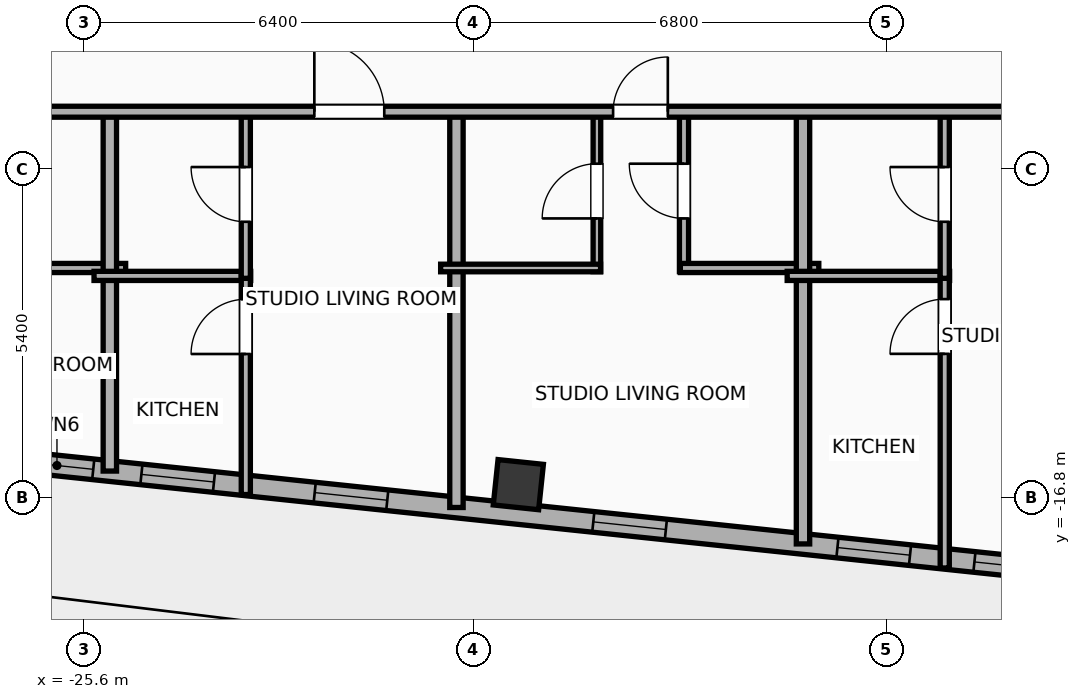
"""IFC4 building model, lengths in metres.
Left out: names, types, materials, properties, quantities, classifications, styles, units other than length and angle.
Written with IfcOpenShell. Run it as: python <this file> out.ifc"""

import sys

from ifc_helpers import new_model, si_unit, direction, frame, frame_2d, origin, origin_2d, place, context, subcontext, project, spatial, rectangle, hollow_rectangle, extrude, element, fill, save


model = new_model("IFC4")
c1 = context("Model", 3, precision=1e-05, world=origin(), true_north=direction((0.0, 1.0)))
c2 = subcontext(c1, "Body", "Model", "MODEL_VIEW")
j1 = project(units=[si_unit("LENGTHUNIT", "METRE"), si_unit("PLANEANGLEUNIT", "RADIAN")], contexts=[c1])
p1 = place(None, origin())
s1 = spatial("IfcSite", under=j1, at=p1, CompositionType="ELEMENT")
p2 = place(p1, origin())
s2 = spatial("IfcBuilding", under=s1, at=p2, CompositionType="ELEMENT")
p3 = place(p2, frame((0.0, 0.0, 291.2)))
s3 = spatial("IfcBuildingStorey", under=s2, at=p3, CompositionType="ELEMENT", Elevation=291.2)
p4 = place(p3, frame((-18.46, -16.583, 0.0), z_axis=(0.0, 0.0, 1.0), x_axis=(0.994521895368, -0.104528463268, 0.0)))
e1 = element("IfcColumn", 1, at=p4, inside=s3, PredefinedType="COLUMN", context=c2, shape_type="SweptSolid", body=[
    extrude(hollow_rectangle(XDim=0.75, YDim=0.75, WallThickness=0.025, at=origin_2d()), origin(), (0.0, 0.0, 1.0), 3.9),
])
p5 = place(p3, frame((18.708, -20.972, 0.0), z_axis=(0.0, 0.0, 1.0), x_axis=(-0.994521888554, 0.104528528102, 0.0)))
e2 = element("IfcWall", 2, at=p5, inside=s3, PredefinedType="ELEMENTEDWALL", context=c2, shape_type="SweptSolid", body=[
    extrude(rectangle(XDim=46.766, YDim=0.34, at=frame_2d((23.383, 0.0))), origin(), (0.0, 0.0, 1.0), 3.635),
])
p6 = place(p5, frame((23.733, 0.0, 0.65)))
e3 = element("IfcOpeningElement", 3, at=p6, cuts=e2, PredefinedType="OPENING", context=c2, shape_type="SweptSolid", body=[
    extrude(rectangle(XDim=2.6, YDim=2.45, at=frame_2d((1.3, 1.225))), frame((0.0, 0.18, 0.0), z_axis=(0.0, -1.0, 0.0), x_axis=(1.0, 0.0, 0.0)), (0.0, 0.0, 1.0), 0.36),
])
p7 = place(p5, frame((44.402, 0.0, 0.75)))
e4 = element("IfcOpeningElement", 4, at=p7, cuts=e2, PredefinedType="OPENING", context=c2, shape_type="SweptSolid", body=[
    extrude(rectangle(XDim=1.2, YDim=2.05, at=frame_2d((0.6, 1.025))), frame((0.0, 0.18, 0.0), z_axis=(0.0, -1.0, 0.0), x_axis=(1.0, 0.0, 0.0)), (0.0, 0.0, 1.0), 0.36),
])
p8 = place(p5, frame((39.54, 0.0, 0.75)))
e5 = element("IfcOpeningElement", 5, at=p8, cuts=e2, PredefinedType="OPENING", context=c2, shape_type="SweptSolid", body=[
    extrude(rectangle(XDim=1.2, YDim=2.05, at=frame_2d((0.6, 1.025))), frame((0.0, 0.18, 0.0), z_axis=(0.0, -1.0, 0.0), x_axis=(1.0, 0.0, 0.0)), (0.0, 0.0, 1.0), 0.36),
])
p9 = place(p5, frame((42.406, 0.0, 0.75)))
e6 = element("IfcOpeningElement", 6, at=p9, cuts=e2, PredefinedType="OPENING", context=c2, shape_type="SweptSolid", body=[
    extrude(rectangle(XDim=1.2, YDim=2.05, at=frame_2d((0.6, 1.025))), frame((0.0, 0.18, 0.0), z_axis=(0.0, -1.0, 0.0), x_axis=(1.0, 0.0, 0.0)), (0.0, 0.0, 1.0), 0.36),
])
p10 = place(p5, frame((34.933, 0.0, 0.75)))
e7 = element("IfcOpeningElement", 7, at=p10, cuts=e2, PredefinedType="OPENING", context=c2, shape_type="SweptSolid", body=[
    extrude(rectangle(XDim=1.2, YDim=2.05, at=frame_2d((0.6, 1.025))), frame((0.0, 0.18, 0.0), z_axis=(0.0, -1.0, 0.0), x_axis=(1.0, 0.0, 0.0)), (0.0, 0.0, 1.0), 0.36),
])
p11 = place(p5, frame((28.631, 0.0, 0.75)))
e8 = element("IfcOpeningElement", 8, at=p11, cuts=e2, PredefinedType="OPENING", context=c2, shape_type="SweptSolid", body=[
    extrude(rectangle(XDim=1.2, YDim=2.05, at=frame_2d((0.6, 1.025))), frame((0.0, 0.18, 0.0), z_axis=(0.0, -1.0, 0.0), x_axis=(1.0, 0.0, 0.0)), (0.0, 0.0, 1.0), 0.36),
])
p12 = place(p5, frame((30.896, 0.0, 0.75)))
e9 = element("IfcOpeningElement", 9, at=p12, cuts=e2, PredefinedType="OPENING", context=c2, shape_type="SweptSolid", body=[
    extrude(rectangle(XDim=1.2, YDim=2.05, at=frame_2d((0.6, 1.025))), frame((0.0, 0.18, 0.0), z_axis=(0.0, -1.0, 0.0), x_axis=(1.0, 0.0, 0.0)), (0.0, 0.0, 1.0), 0.36),
])
p13 = place(p5, frame((7.501, 0.0, 0.75)))
e10 = element("IfcOpeningElement", 10, at=p13, cuts=e2, PredefinedType="OPENING", context=c2, shape_type="SweptSolid", body=[
    extrude(rectangle(XDim=1.2, YDim=2.05, at=frame_2d((0.6, 1.025))), frame((0.0, 0.18, 0.0), z_axis=(0.0, -1.0, 0.0), x_axis=(1.0, 0.0, 0.0)), (0.0, 0.0, 1.0), 0.36),
])
p14 = place(p5, frame((4.159, 0.0, 0.75)))
e11 = element("IfcOpeningElement", 11, at=p14, cuts=e2, PredefinedType="OPENING", context=c2, shape_type="SweptSolid", body=[
    extrude(rectangle(XDim=1.2, YDim=2.05, at=frame_2d((0.6, 1.025))), frame((0.0, 0.18, 0.0), z_axis=(0.0, -1.0, 0.0), x_axis=(1.0, 0.0, 0.0)), (0.0, 0.0, 1.0), 0.36),
])
p15 = place(p5, frame((1.369, 0.0, 0.75)))
e12 = element("IfcOpeningElement", 12, at=p15, cuts=e2, PredefinedType="OPENING", context=c2, shape_type="SweptSolid", body=[
    extrude(rectangle(XDim=1.2, YDim=2.05, at=frame_2d((0.6, 1.025))), frame((0.0, 0.18, 0.0), z_axis=(0.0, -1.0, 0.0), x_axis=(1.0, 0.0, 0.0)), (0.0, 0.0, 1.0), 0.36),
])
p16 = place(p5, frame((20.254, 0.0, 0.75)))
e13 = element("IfcOpeningElement", 13, at=p16, cuts=e2, PredefinedType="OPENING", context=c2, shape_type="SweptSolid", body=[
    extrude(rectangle(XDim=1.2, YDim=2.05, at=frame_2d((0.6, 1.025))), frame((0.0, 0.18, 0.0), z_axis=(0.0, -1.0, 0.0), x_axis=(1.0, 0.0, 0.0)), (0.0, 0.0, 1.0), 0.36),
])
p17 = place(p5, frame((16.172, 0.0, 0.75)))
e14 = element("IfcOpeningElement", 14, at=p17, cuts=e2, PredefinedType="OPENING", context=c2, shape_type="SweptSolid", body=[
    extrude(rectangle(XDim=1.2, YDim=2.05, at=frame_2d((0.6, 1.025))), frame((0.0, 0.18, 0.0), z_axis=(0.0, -1.0, 0.0), x_axis=(1.0, 0.0, 0.0)), (0.0, 0.0, 1.0), 0.36),
])
p18 = place(p5, frame((12.11, 0.0, 0.75)))
e15 = element("IfcOpeningElement", 15, at=p18, cuts=e2, PredefinedType="OPENING", context=c2, shape_type="SweptSolid", body=[
    extrude(rectangle(XDim=1.2, YDim=2.05, at=frame_2d((0.6, 1.025))), frame((0.0, 0.18, 0.0), z_axis=(0.0, -1.0, 0.0), x_axis=(1.0, 0.0, 0.0)), (0.0, 0.0, 1.0), 0.36),
])
p19 = place(p3, frame((-27.215, -13.02, 0.0), z_axis=(0.0, 0.0, 1.0), x_axis=(1.0, 0.0, 0.0)))
e16 = element("IfcWall", 16, at=p19, inside=s3, PredefinedType="PLUMBINGWALL", context=c2, shape_type="SweptSolid", body=[
    extrude(rectangle(XDim=2.297, YDim=0.15, at=frame_2d((1.148, 0.0))), origin(), (0.0, 0.0, 1.0), 3.635),
])
p20 = place(p3, frame((-25.178, -16.36, 0.0), z_axis=(0.0, 0.0, 1.0), x_axis=(0.0, 1.0, 0.0)))
e17 = element("IfcWall", 17, at=p20, inside=s3, PredefinedType="PARTITIONING", context=c2, shape_type="SweptSolid", body=[
    extrude(rectangle(XDim=5.99, YDim=0.22, at=frame_2d((2.995, 0.0))), origin(), (0.0, 0.0, 1.0), 3.635),
])
p21 = place(p3, frame((-25.438, -13.15, 0.0), z_axis=(0.0, 0.0, 1.0), x_axis=(1.0, 0.0, 0.0)))
e18 = element("IfcWall", 18, at=p21, inside=s3, PredefinedType="PLUMBINGWALL", context=c2, shape_type="SweptSolid", body=[
    extrude(rectangle(XDim=2.576, YDim=0.15, at=frame_2d((1.288, 0.0))), origin(), (0.0, 0.0, 1.0), 3.635),
])
p22 = place(p3, frame((-22.942, -16.745, 0.0), z_axis=(0.0, 0.0, 1.0), x_axis=(0.0, 1.0, 0.0)))
e19 = element("IfcWall", 19, at=p22, inside=s3, PredefinedType="PLUMBINGWALL", context=c2, shape_type="SweptSolid", body=[
    extrude(rectangle(XDim=3.635, YDim=0.15, at=frame_2d((1.818, 0.0))), origin(), (0.0, 0.0, 1.0), 3.635),
])
p23 = place(p22, frame((2.311, 0.0, 0.0)))
e20 = element("IfcOpeningElement", 20, at=p23, cuts=e19, PredefinedType="OPENING", context=c2, shape_type="SweptSolid", body=[
    extrude(rectangle(XDim=0.9, YDim=2.05, at=frame_2d((0.45, 1.025))), frame((0.0, 0.085, 0.0), z_axis=(0.0, -1.0, 0.0), x_axis=(1.0, 0.0, 0.0)), (0.0, 0.0, 1.0), 0.17),
])
p24 = place(p3, frame((-22.942, -13.19, 0.0), z_axis=(0.0, 0.0, 1.0), x_axis=(0.0, 1.0, 0.0)))
e21 = element("IfcWall", 21, at=p24, inside=s3, PredefinedType="PLUMBINGWALL", context=c2, shape_type="SweptSolid", body=[
    extrude(rectangle(XDim=2.76, YDim=0.15, at=frame_2d((1.38, 0.0))), origin(), (0.0, 0.0, 1.0), 3.635),
])
p25 = place(p24, frame((0.93, 0.0, 0.0)))
e22 = element("IfcOpeningElement", 22, at=p25, cuts=e21, PredefinedType="OPENING", context=c2, shape_type="SweptSolid", body=[
    extrude(rectangle(XDim=0.9, YDim=2.05, at=frame_2d((0.45, 1.025))), frame((0.0, 0.085, 0.0), z_axis=(0.0, -1.0, 0.0), x_axis=(1.0, 0.0, 0.0)), (0.0, 0.0, 1.0), 0.17),
])
p26 = place(p3, frame((-19.478, -16.959, 0.0), z_axis=(0.0, 0.0, 1.0), x_axis=(0.0, 1.0, 0.0)))
e23 = element("IfcWall", 23, at=p26, inside=s3, PredefinedType="PARTITIONING", context=c2, shape_type="SweptSolid", body=[
    extrude(rectangle(XDim=6.589, YDim=0.22, at=frame_2d((3.294, 0.0))), origin(), (0.0, 0.0, 1.0), 3.635),
])
p27 = place(p3, frame((-17.168, -13.08, 0.0), z_axis=(0.0, 0.0, 1.0), x_axis=(0.0, 1.0, 0.0)))
e24 = element("IfcWall", 24, at=p27, inside=s3, PredefinedType="PARTITIONING", context=c2, shape_type="SweptSolid", body=[
    extrude(rectangle(XDim=2.65, YDim=0.125, at=frame_2d((1.325, 0.0))), origin(), (0.0, 0.0, 1.0), 3.635),
])
p28 = place(p27, frame((0.875, 0.0, 0.0)))
e25 = element("IfcOpeningElement", 25, at=p28, cuts=e24, PredefinedType="OPENING", context=c2, shape_type="SweptSolid", body=[
    extrude(rectangle(XDim=0.9, YDim=2.05, at=frame_2d((0.45, 1.025))), frame((0.0, 0.073, 0.0), z_axis=(0.0, -1.0, 0.0), x_axis=(1.0, 0.0, 0.0)), (0.0, 0.0, 1.0), 0.145),
])
p29 = place(p3, frame((-15.736, -13.08, 0.0), z_axis=(0.0, 0.0, 1.0), x_axis=(0.0, 1.0, 0.0)))
e26 = element("IfcWall", 26, at=p29, inside=s3, PredefinedType="PLUMBINGWALL", context=c2, shape_type="SweptSolid", body=[
    extrude(rectangle(XDim=2.65, YDim=0.15, at=frame_2d((1.325, 0.0))), origin(), (0.0, 0.0, 1.0), 3.635),
])
p30 = place(p29, frame((0.875, 0.0, 0.0)))
e27 = element("IfcOpeningElement", 27, at=p30, cuts=e26, PredefinedType="OPENING", context=c2, shape_type="SweptSolid", body=[
    extrude(rectangle(XDim=0.9, YDim=2.05, at=frame_2d((0.45, 1.025))), frame((0.0, 0.085, 0.0), z_axis=(0.0, -1.0, 0.0), x_axis=(1.0, 0.0, 0.0)), (0.0, 0.0, 1.0), 0.17),
])
p31 = place(p3, frame((-19.738, -13.02, 0.0), z_axis=(0.0, 0.0, 1.0), x_axis=(1.0, 0.0, 0.0)))
e28 = element("IfcWall", 28, at=p31, inside=s3, PredefinedType="PARTITIONING", context=c2, shape_type="SweptSolid", body=[
    extrude(rectangle(XDim=2.63, YDim=0.125, at=frame_2d((1.315, 0.0))), origin(), (0.0, 0.0, 1.0), 3.635),
])
p32 = place(p3, frame((-15.796, -13.02, 0.0), z_axis=(0.0, 0.0, 1.0), x_axis=(1.0, 0.0, 0.0)))
e29 = element("IfcWall", 29, at=p32, inside=s3, PredefinedType="PLUMBINGWALL", context=c2, shape_type="SweptSolid", body=[
    extrude(rectangle(XDim=2.277, YDim=0.15, at=frame_2d((1.138, 0.0))), origin(), (0.0, 0.0, 1.0), 3.635),
])
p33 = place(p3, frame((-13.779, -17.558, 0.0), z_axis=(0.0, 0.0, 1.0), x_axis=(0.0, 1.0, 0.0)))
e30 = element("IfcWall", 30, at=p33, inside=s3, PredefinedType="PARTITIONING", context=c2, shape_type="SweptSolid", body=[
    extrude(rectangle(XDim=7.188, YDim=0.22, at=frame_2d((3.594, 0.0))), origin(), (0.0, 0.0, 1.0), 3.635),
])
p34 = place(p3, frame((-14.039, -13.15, 0.0), z_axis=(0.0, 0.0, 1.0), x_axis=(1.0, 0.0, 0.0)))
e31 = element("IfcWall", 31, at=p34, inside=s3, PredefinedType="PLUMBINGWALL", context=c2, shape_type="SweptSolid", body=[
    extrude(rectangle(XDim=2.671, YDim=0.15, at=frame_2d((1.335, 0.0))), origin(), (0.0, 0.0, 1.0), 3.635),
])
p35 = place(p3, frame((-11.448, -17.954, 0.0), z_axis=(0.0, 0.0, 1.0), x_axis=(0.0, 1.0, 0.0)))
e32 = element("IfcWall", 32, at=p35, inside=s3, PredefinedType="PLUMBINGWALL", context=c2, shape_type="SweptSolid", body=[
    extrude(rectangle(XDim=4.844, YDim=0.15, at=frame_2d((2.422, 0.0))), origin(), (0.0, 0.0, 1.0), 3.635),
])
p36 = place(p35, frame((3.522, 0.0, 0.0)))
e33 = element("IfcOpeningElement", 33, at=p36, cuts=e32, PredefinedType="OPENING", context=c2, shape_type="SweptSolid", body=[
    extrude(rectangle(XDim=0.9, YDim=2.05, at=frame_2d((0.45, 1.025))), frame((0.0, 0.085, 0.0), z_axis=(0.0, -1.0, 0.0), x_axis=(1.0, 0.0, 0.0)), (0.0, 0.0, 1.0), 0.17),
])
p37 = place(p3, frame((-11.448, -13.19, 0.0), z_axis=(0.0, 0.0, 1.0), x_axis=(0.0, 1.0, 0.0)))
e34 = element("IfcWall", 34, at=p37, inside=s3, PredefinedType="PLUMBINGWALL", context=c2, shape_type="SweptSolid", body=[
    extrude(rectangle(XDim=2.76, YDim=0.15, at=frame_2d((1.38, 0.0))), origin(), (0.0, 0.0, 1.0), 3.075),
])
p38 = place(p37, frame((0.93, 0.0, 0.0)))
e35 = element("IfcOpeningElement", 35, at=p38, cuts=e34, PredefinedType="OPENING", context=c2, shape_type="SweptSolid", body=[
    extrude(rectangle(XDim=0.9, YDim=2.05, at=frame_2d((0.45, 1.025))), frame((0.0, 0.085, 0.0), z_axis=(0.0, -1.0, 0.0), x_axis=(1.0, 0.0, 0.0)), (0.0, 0.0, 1.0), 0.17),
])
p39 = place(p3, frame((-30.676, -10.45, 0.0), z_axis=(0.0, 0.0, 1.0), x_axis=(1.0, 0.0, 0.0)))
e36 = element("IfcWall", 36, at=p39, inside=s3, PredefinedType="PARTITIONING", context=c2, shape_type="SweptSolid", body=[
    extrude(rectangle(XDim=22.596, YDim=0.18, at=frame_2d((11.298, 0.0))), origin(), (0.0, 0.0, 1.0), 3.635),
])
p40 = place(p39, frame((2.336, 0.0, 0.0)))
e37 = element("IfcOpeningElement", 37, at=p40, cuts=e36, PredefinedType="OPENING", context=c2, shape_type="SweptSolid", body=[
    extrude(rectangle(XDim=0.9, YDim=2.05, at=frame_2d((0.45, 1.025))), frame((0.0, 0.1, 0.0), z_axis=(0.0, -1.0, 0.0), x_axis=(1.0, 0.0, 0.0)), (0.0, 0.0, 1.0), 0.2),
])
p41 = place(p39, frame((8.861, 0.0, 0.0)))
e38 = element("IfcOpeningElement", 38, at=p41, cuts=e36, PredefinedType="OPENING", context=c2, shape_type="SweptSolid", body=[
    extrude(rectangle(XDim=1.15, YDim=2.05, at=frame_2d((0.575, 1.025))), frame((0.0, 0.1, 0.0), z_axis=(0.0, -1.0, 0.0), x_axis=(1.0, 0.0, 0.0)), (0.0, 0.0, 1.0), 0.2),
])
p42 = place(p39, frame((13.774, 0.0, 0.0)))
e39 = element("IfcOpeningElement", 39, at=p42, cuts=e36, PredefinedType="OPENING", context=c2, shape_type="SweptSolid", body=[
    extrude(rectangle(XDim=0.9, YDim=2.05, at=frame_2d((0.45, 1.025))), frame((0.0, 0.1, 0.0), z_axis=(0.0, -1.0, 0.0), x_axis=(1.0, 0.0, 0.0)), (0.0, 0.0, 1.0), 0.2),
])
p43 = place(p39, frame((20.306, 0.0, 0.0)))
e40 = element("IfcOpeningElement", 40, at=p43, cuts=e36, PredefinedType="OPENING", context=c2, shape_type="SweptSolid", body=[
    extrude(rectangle(XDim=1.15, YDim=2.05, at=frame_2d((0.575, 1.025))), frame((0.0, 0.1, 0.0), z_axis=(0.0, -1.0, 0.0), x_axis=(1.0, 0.0, 0.0)), (0.0, 0.0, 1.0), 0.2),
])
p44 = place(p7, origin())
e41 = element("IfcWindow", 41, at=p44, inside=s3, PartitioningType="SINGLE_PANEL", PredefinedType="WINDOW", context=c2, shape_type="SweptSolid", body=[
    extrude(rectangle(XDim=1.2, YDim=2.05, at=frame_2d((0.6, 1.025))), frame((0.0, 0.03, 0.0), z_axis=(0.0, -1.0, 0.0), x_axis=(1.0, 0.0, 0.0)), (0.0, 0.0, 1.0), 0.06),
])
fill(e4, e41)
p45 = place(p8, origin())
e42 = element("IfcWindow", 42, at=p45, inside=s3, PartitioningType="SINGLE_PANEL", PredefinedType="WINDOW", context=c2, shape_type="SweptSolid", body=[
    extrude(rectangle(XDim=1.2, YDim=2.05, at=frame_2d((0.6, 1.025))), frame((0.0, 0.03, 0.0), z_axis=(0.0, -1.0, 0.0), x_axis=(1.0, 0.0, 0.0)), (0.0, 0.0, 1.0), 0.06),
])
fill(e5, e42)
p46 = place(p9, origin())
e43 = element("IfcWindow", 43, at=p46, inside=s3, PartitioningType="SINGLE_PANEL", PredefinedType="WINDOW", context=c2, shape_type="SweptSolid", body=[
    extrude(rectangle(XDim=1.2, YDim=2.05, at=frame_2d((0.6, 1.025))), frame((0.0, 0.03, 0.0), z_axis=(0.0, -1.0, 0.0), x_axis=(1.0, 0.0, 0.0)), (0.0, 0.0, 1.0), 0.06),
])
fill(e6, e43)
p47 = place(p10, origin())
e44 = element("IfcWindow", 44, at=p47, inside=s3, PartitioningType="SINGLE_PANEL", PredefinedType="WINDOW", context=c2, shape_type="SweptSolid", body=[
    extrude(rectangle(XDim=1.2, YDim=2.05, at=frame_2d((0.6, 1.025))), frame((0.0, 0.03, 0.0), z_axis=(0.0, -1.0, 0.0), x_axis=(1.0, 0.0, 0.0)), (0.0, 0.0, 1.0), 0.06),
])
fill(e7, e44)
p48 = place(p11, origin())
e45 = element("IfcWindow", 45, at=p48, inside=s3, PartitioningType="SINGLE_PANEL", PredefinedType="WINDOW", context=c2, shape_type="SweptSolid", body=[
    extrude(rectangle(XDim=1.2, YDim=2.05, at=frame_2d((0.6, 1.025))), frame((0.0, 0.03, 0.0), z_axis=(0.0, -1.0, 0.0), x_axis=(1.0, 0.0, 0.0)), (0.0, 0.0, 1.0), 0.06),
])
fill(e8, e45)
p49 = place(p12, origin())
e46 = element("IfcWindow", 46, at=p49, inside=s3, PartitioningType="SINGLE_PANEL", PredefinedType="WINDOW", context=c2, shape_type="SweptSolid", body=[
    extrude(rectangle(XDim=1.2, YDim=2.05, at=frame_2d((0.6, 1.025))), frame((0.0, 0.03, 0.0), z_axis=(0.0, -1.0, 0.0), x_axis=(1.0, 0.0, 0.0)), (0.0, 0.0, 1.0), 0.06),
])
fill(e9, e46)
p50 = place(p23, origin())
e47 = element("IfcDoor", 47, at=p50, inside=s3, OperationType="SINGLE_SWING_LEFT", PredefinedType="DOOR", context=c2, shape_type="SweptSolid", body=[
    extrude(rectangle(XDim=0.9, YDim=2.05, at=frame_2d((0.45, 1.025))), frame((0.0, 0.025, 0.0), z_axis=(0.0, -1.0, 0.0), x_axis=(1.0, 0.0, 0.0)), (0.0, 0.0, 1.0), 0.05),
])
fill(e20, e47)
p51 = place(p25, origin())
e48 = element("IfcDoor", 48, at=p51, inside=s3, OperationType="SINGLE_SWING_RIGHT", PredefinedType="DOOR", context=c2, shape_type="SweptSolid", body=[
    extrude(rectangle(XDim=0.9, YDim=2.05, at=frame_2d((0.45, 1.025))), frame((0.0, 0.025, 0.0), z_axis=(0.0, -1.0, 0.0), x_axis=(1.0, 0.0, 0.0)), (0.0, 0.0, 1.0), 0.05),
])
fill(e22, e48)
p52 = place(p28, origin())
e49 = element("IfcDoor", 49, at=p52, inside=s3, OperationType="SINGLE_SWING_LEFT", PredefinedType="DOOR", context=c2, shape_type="SweptSolid", body=[
    extrude(rectangle(XDim=0.9, YDim=2.05, at=frame_2d((0.45, 1.025))), frame((0.0, 0.025, 0.0), z_axis=(0.0, -1.0, 0.0), x_axis=(1.0, 0.0, 0.0)), (0.0, 0.0, 1.0), 0.05),
])
fill(e25, e49)
p53 = place(p30, origin())
e50 = element("IfcDoor", 50, at=p53, inside=s3, OperationType="SINGLE_SWING_RIGHT", PredefinedType="DOOR", context=c2, shape_type="SweptSolid", body=[
    extrude(rectangle(XDim=0.9, YDim=2.05, at=frame_2d((0.45, 1.025))), frame((0.0, 0.025, 0.0), z_axis=(0.0, -1.0, 0.0), x_axis=(1.0, 0.0, 0.0)), (0.0, 0.0, 1.0), 0.05),
])
fill(e27, e50)
p54 = place(p36, origin())
e51 = element("IfcDoor", 51, at=p54, inside=s3, OperationType="SINGLE_SWING_LEFT", PredefinedType="DOOR", context=c2, shape_type="SweptSolid", body=[
    extrude(rectangle(XDim=0.9, YDim=2.05, at=frame_2d((0.45, 1.025))), frame((0.0, 0.025, 0.0), z_axis=(0.0, -1.0, 0.0), x_axis=(1.0, 0.0, 0.0)), (0.0, 0.0, 1.0), 0.05),
])
fill(e33, e51)
p55 = place(p38, origin())
e52 = element("IfcDoor", 52, at=p55, inside=s3, OperationType="SINGLE_SWING_RIGHT", PredefinedType="DOOR", context=c2, shape_type="SweptSolid", body=[
    extrude(rectangle(XDim=0.9, YDim=2.05, at=frame_2d((0.45, 1.025))), frame((0.0, 0.025, 0.0), z_axis=(0.0, -1.0, 0.0), x_axis=(1.0, 0.0, 0.0)), (0.0, 0.0, 1.0), 0.05),
])
fill(e35, e52)
p56 = place(p41, origin())
e53 = element("IfcDoor", 53, at=p56, inside=s3, OperationType="SINGLE_SWING_LEFT", PredefinedType="DOOR", context=c2, shape_type="SweptSolid", body=[
    extrude(rectangle(XDim=1.15, YDim=2.05, at=frame_2d((0.575, 1.025))), frame((0.0, 0.025, 0.0), z_axis=(0.0, -1.0, 0.0), x_axis=(1.0, 0.0, 0.0)), (0.0, 0.0, 1.0), 0.05),
])
fill(e38, e53)
p57 = place(p42, origin())
e54 = element("IfcDoor", 54, at=p57, inside=s3, OperationType="SINGLE_SWING_RIGHT", PredefinedType="DOOR", context=c2, shape_type="SweptSolid", body=[
    extrude(rectangle(XDim=0.9, YDim=2.05, at=frame_2d((0.45, 1.025))), frame((0.0, 0.025, 0.0), z_axis=(0.0, -1.0, 0.0), x_axis=(1.0, 0.0, 0.0)), (0.0, 0.0, 1.0), 0.05),
])
fill(e39, e54)
save(model, sys.argv[1])
